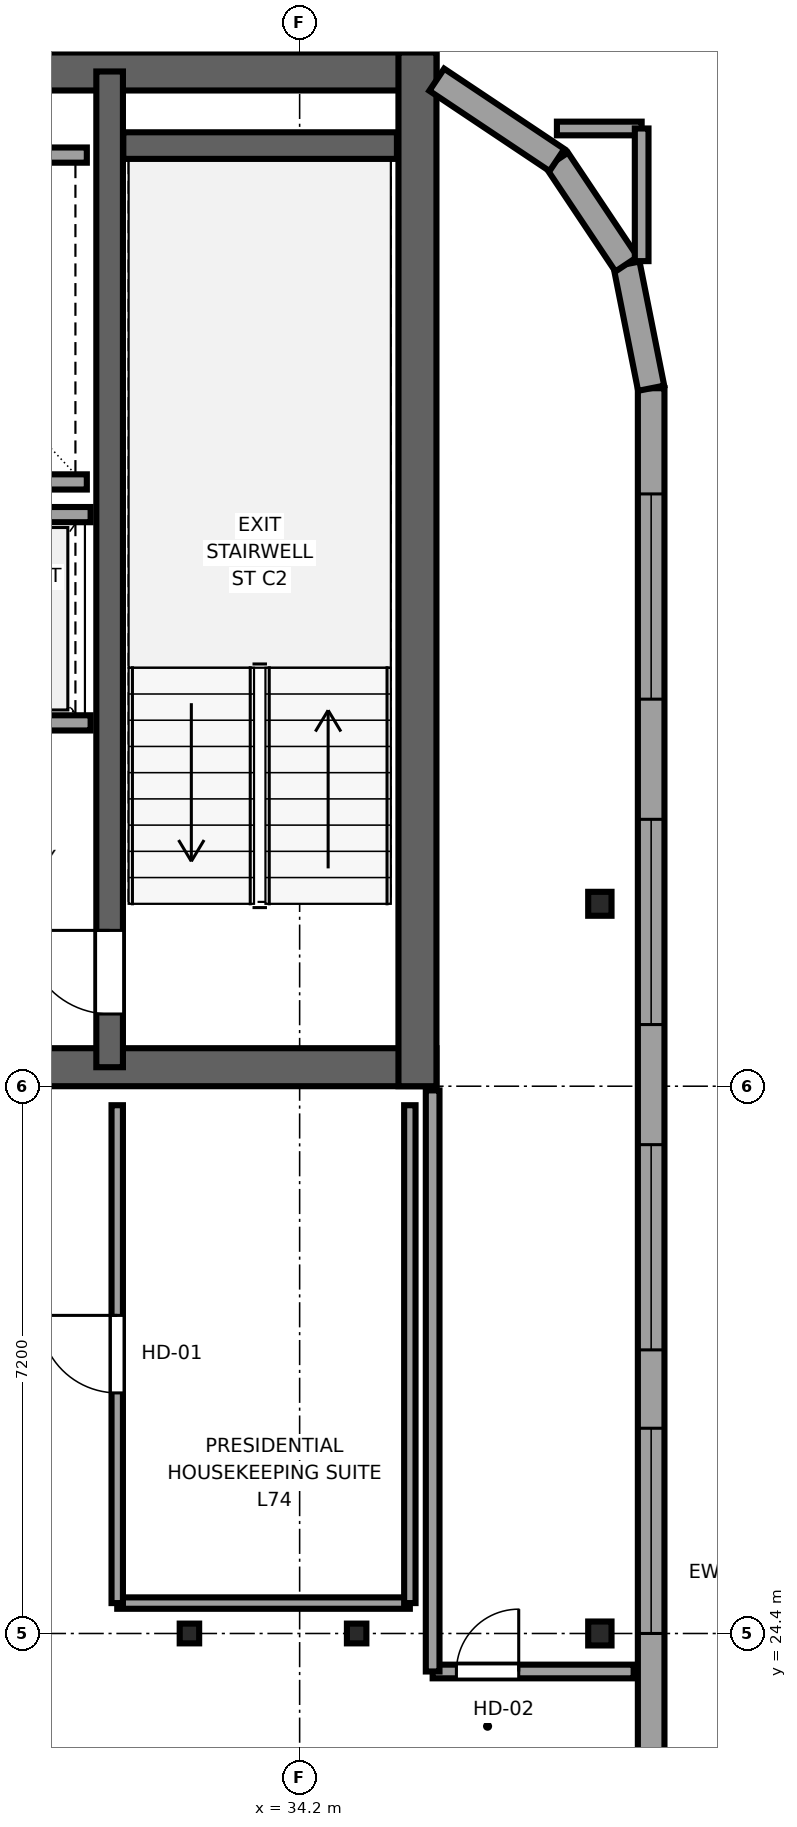
"""IFC4 building model, lengths in metres.
Left out: names, types, materials, properties, quantities, classifications, styles, units other than length and angle.
Written with IfcOpenShell. Run it as: python <this file> out.ifc"""

import sys

from ifc_helpers import new_model, si_unit, direction, frame, frame_2d, origin, origin_2d, place, context, subcontext, project, spatial, rectangle, i_section, extrude, source, transform, mapped, element, fill, save


model = new_model("IFC4")
c1 = context("Model", 3, precision=1e-05, world=origin(), true_north=direction((0.0, 1.0)))
c2 = subcontext(c1, "Body", "Model", "MODEL_VIEW")
j1 = project(units=[si_unit("LENGTHUNIT", "METRE"), si_unit("PLANEANGLEUNIT", "RADIAN")], contexts=[c1])
p1 = place(None, origin())
s1 = spatial("IfcSite", under=j1, at=p1, CompositionType="ELEMENT")
p2 = place(p1, origin())
s2 = spatial("IfcBuilding", under=s1, at=p2, CompositionType="ELEMENT")
p3 = place(p2, frame((0.0, 0.0, 278.6)))
s3 = spatial("IfcBuildingStorey", under=s2, at=p3, CompositionType="ELEMENT", Elevation=278.6)
p4 = place(p3, frame((10.0, 31.85, 0.0), z_axis=(0.0, 0.0, 1.0), x_axis=(1.0, 0.0, 0.0)))
e1 = element("IfcWall", 1, at=p4, inside=s3, PredefinedType="SHEAR", context=c2, shape_type="SweptSolid", body=[
    extrude(rectangle(XDim=26.0, YDim=0.5, at=frame_2d((13.0, 0.0))), origin(), (0.0, 0.0, 1.0), 3.55),
])
p5 = place(p4, frame((7.45, 0.0, 0.0), z_axis=(0.0, 0.0, 1.0), x_axis=(-1.0, 0.0, 0.0)))
e2 = element("IfcOpeningElement", 2, at=p5, cuts=e1, PredefinedType="OPENING", context=c2, shape_type="SweptSolid", body=[
    extrude(rectangle(XDim=1.5, YDim=2.04, at=frame_2d((0.75, 1.02))), frame((0.0, 0.26, 0.0), z_axis=(0.0, -1.0, 0.0), x_axis=(1.0, 0.0, 0.0)), (0.0, 0.0, 1.0), 0.52),
])
p6 = place(p4, frame((13.75, 0.0, 0.0), z_axis=(0.0, 0.0, 1.0), x_axis=(-1.0, 0.0, 0.0)))
e3 = element("IfcOpeningElement", 3, at=p6, cuts=e1, PredefinedType="OPENING", context=c2, shape_type="SweptSolid", body=[
    extrude(rectangle(XDim=1.5, YDim=2.04, at=frame_2d((0.75, 1.02))), frame((0.0, 0.26, 0.0), z_axis=(0.0, -1.0, 0.0), x_axis=(1.0, 0.0, 0.0)), (0.0, 0.0, 1.0), 0.52),
])
p7 = place(p4, frame((20.05, 0.0, 0.0), z_axis=(0.0, 0.0, 1.0), x_axis=(-1.0, 0.0, 0.0)))
e4 = element("IfcOpeningElement", 4, at=p7, cuts=e1, PredefinedType="OPENING", context=c2, shape_type="SweptSolid", body=[
    extrude(rectangle(XDim=1.5, YDim=2.04, at=frame_2d((0.75, 1.02))), frame((0.0, 0.26, 0.0), z_axis=(0.0, -1.0, 0.0), x_axis=(1.0, 0.0, 0.0)), (0.0, 0.0, 1.0), 0.52),
])
p8 = place(p3, frame((10.0, 44.95, 0.0), z_axis=(0.0, 0.0, 1.0), x_axis=(1.0, 0.0, 0.0)))
e5 = element("IfcWall", 5, at=p8, inside=s3, PredefinedType="SHEAR", context=c2, shape_type="SweptSolid", body=[
    extrude(rectangle(XDim=26.0, YDim=0.5, at=frame_2d((13.0, 0.0))), origin(), (0.0, 0.0, 1.0), 3.55),
])
p9 = place(p3, frame((35.75, 31.6, 0.0), z_axis=(0.0, 0.0, 1.0), x_axis=(0.0, 1.0, 0.0)))
e6 = element("IfcWall", 6, at=p9, inside=s3, PredefinedType="SHEAR", context=c2, shape_type="SweptSolid", body=[
    extrude(rectangle(XDim=13.6, YDim=0.5, at=frame_2d((6.8, 0.0))), origin(), (0.0, 0.0, 1.0), 3.55),
])
p10 = place(p3, frame((31.7, 31.85, 0.0), z_axis=(0.0, 0.0, 1.0), x_axis=(0.0, 1.0, 0.0)))
e7 = element("IfcWall", 7, at=p10, inside=s3, PredefinedType="SHEAR", context=c2, shape_type="SweptSolid", body=[
    extrude(rectangle(XDim=13.1, YDim=0.35, at=frame_2d((6.55, 0.0))), origin(), (0.0, 0.0, 1.0), 3.55),
])
p11 = place(p10, frame((1.8, 0.0, 0.0), z_axis=(0.0, 0.0, 1.0), x_axis=(-1.0, 0.0, 0.0)))
e8 = element("IfcOpeningElement", 8, at=p11, cuts=e7, PredefinedType="OPENING", context=c2, shape_type="SweptSolid", body=[
    extrude(rectangle(XDim=1.1, YDim=2.12, at=frame_2d((0.55, 1.06))), frame((0.0, 0.185, 0.0), z_axis=(0.0, -1.0, 0.0), x_axis=(1.0, 0.0, 0.0)), (0.0, 0.0, 1.0), 0.37),
])
p12 = place(p3, frame((31.88, 43.975, 0.0), z_axis=(0.0, 0.0, 1.0), x_axis=(1.0, 0.0, 0.0)))
e9 = element("IfcWall", 9, at=p12, inside=s3, PredefinedType="SHEAR", context=c2, shape_type="SweptSolid", body=[
    extrude(rectangle(XDim=3.6, YDim=0.35, at=frame_2d((1.8, 0.0))), origin(), (0.0, 0.0, 1.0), 3.55),
])
m1 = source(origin(), c2, "Body", "SweptSolid", [
    extrude(i_section(OverallWidth=0.256, OverallDepth=0.26, WebThickness=0.01, FlangeThickness=0.017, FilletRadius=0.014, at=origin_2d()), origin(), (0.0, 0.0, 1.0), 3.55),
])
for number, where, z_axis, x_axis in (
    (10, (32.75, 24.4, 0.0), (0.0, 0.0, 1.0), (1.0, 0.0, 0.0)),
    (11, (34.95, 24.4, 0.0), (0.0, 0.0, 1.0), (1.0, 0.0, 0.0)),
):
    element("IfcColumn", number, at=place(p3, frame(where, z_axis=z_axis, x_axis=x_axis)), inside=s3, PredefinedType="COLUMN", context=c2, shape_type="MappedRepresentation", body=[
        mapped(m1, transform((0.0, 0.0, 0.0), x_axis=(1.0, 0.0, 0.0), y_axis=(0.0, 1.0, 0.0), z_axis=(0.0, 0.0, 1.0), scale=1.0)),
    ])
m2 = source(origin(), c2, "Body", "SweptSolid", [
    extrude(i_section(OverallWidth=0.307, OverallDepth=0.315, WebThickness=0.012, FlangeThickness=0.019, FilletRadius=0.017, at=origin_2d()), origin(), (0.0, 0.0, 1.0), 3.55),
])
for number, where, z_axis, x_axis in (
    (12, (38.15, 24.4, 0.0), (0.0, 0.0, 1.0), (1.0, 0.0, 0.0)),
    (13, (38.15, 34.0, 0.0), (0.0, 0.0, 1.0), (1.0, 0.0, 0.0)),
):
    element("IfcColumn", number, at=place(p3, frame(where, z_axis=z_axis, x_axis=x_axis)), inside=s3, PredefinedType="COLUMN", context=c2, shape_type="MappedRepresentation", body=[
        mapped(m2, transform((0.0, 0.0, 0.0), x_axis=(1.0, 0.0, 0.0), y_axis=(0.0, 1.0, 0.0), z_axis=(0.0, 0.0, 1.0), scale=1.0)),
    ])
p13 = place(p3, frame((38.825, 9.617, 0.0), z_axis=(0.0, 0.0, 1.0), x_axis=(0.0, 1.0, 0.0)))
e14 = element("IfcWall", 14, at=p13, inside=s3, PredefinedType="SOLIDWALL", context=c2, shape_type="SweptSolid", body=[
    extrude(rectangle(XDim=31.166, YDim=0.35, at=frame_2d((15.583, 0.0))), origin(), (0.0, 0.0, 1.0), 3.33),
])
p14 = place(p13, frame((0.84, 0.0, 0.68)))
e15 = element("IfcOpeningElement", 15, at=p14, cuts=e14, PredefinedType="OPENING", context=c2, shape_type="SweptSolid", body=[
    extrude(rectangle(XDim=2.7, YDim=1.95, at=frame_2d((1.35, 0.975))), frame((0.0, 0.185, 0.0), z_axis=(0.0, -1.0, 0.0), x_axis=(1.0, 0.0, 0.0)), (0.0, 0.0, 1.0), 0.37),
])
p15 = place(p13, frame((5.671, 0.0, 0.68)))
e16 = element("IfcOpeningElement", 16, at=p15, cuts=e14, PredefinedType="OPENING", context=c2, shape_type="SweptSolid", body=[
    extrude(rectangle(XDim=2.7, YDim=1.95, at=frame_2d((1.35, 0.975))), frame((0.0, 0.185, 0.0), z_axis=(0.0, -1.0, 0.0), x_axis=(1.0, 0.0, 0.0)), (0.0, 0.0, 1.0), 0.37),
])
p16 = place(p13, frame((8.902, 0.0, 0.68)))
e17 = element("IfcOpeningElement", 17, at=p16, cuts=e14, PredefinedType="OPENING", context=c2, shape_type="SweptSolid", body=[
    extrude(rectangle(XDim=2.7, YDim=1.95, at=frame_2d((1.35, 0.975))), frame((0.0, 0.185, 0.0), z_axis=(0.0, -1.0, 0.0), x_axis=(1.0, 0.0, 0.0)), (0.0, 0.0, 1.0), 0.37),
])
p17 = place(p13, frame((14.783, 0.0, 0.68)))
e18 = element("IfcOpeningElement", 18, at=p17, cuts=e14, PredefinedType="OPENING", context=c2, shape_type="SweptSolid", body=[
    extrude(rectangle(XDim=2.7, YDim=1.95, at=frame_2d((1.35, 0.975))), frame((0.0, 0.185, 0.0), z_axis=(0.0, -1.0, 0.0), x_axis=(1.0, 0.0, 0.0)), (0.0, 0.0, 1.0), 0.37),
])
p18 = place(p13, frame((18.514, 0.0, 0.68)))
e19 = element("IfcOpeningElement", 19, at=p18, cuts=e14, PredefinedType="OPENING", context=c2, shape_type="SweptSolid", body=[
    extrude(rectangle(XDim=2.7, YDim=1.95, at=frame_2d((1.35, 0.975))), frame((0.0, 0.185, 0.0), z_axis=(0.0, -1.0, 0.0), x_axis=(1.0, 0.0, 0.0)), (0.0, 0.0, 1.0), 0.37),
])
p19 = place(p13, frame((22.794, 0.0, 0.68)))
e20 = element("IfcOpeningElement", 20, at=p19, cuts=e14, PredefinedType="OPENING", context=c2, shape_type="SweptSolid", body=[
    extrude(rectangle(XDim=2.7, YDim=1.95, at=frame_2d((1.35, 0.975))), frame((0.0, 0.185, 0.0), z_axis=(0.0, -1.0, 0.0), x_axis=(1.0, 0.0, 0.0)), (0.0, 0.0, 1.0), 0.37),
])
p20 = place(p13, frame((27.075, 0.0, 0.68)))
e21 = element("IfcOpeningElement", 21, at=p20, cuts=e14, PredefinedType="OPENING", context=c2, shape_type="SweptSolid", body=[
    extrude(rectangle(XDim=2.7, YDim=1.95, at=frame_2d((1.35, 0.975))), frame((0.0, 0.185, 0.0), z_axis=(0.0, -1.0, 0.0), x_axis=(1.0, 0.0, 0.0)), (0.0, 0.0, 1.0), 0.37),
])
p21 = place(p3, frame((38.825, 40.783, 0.0), z_axis=(0.0, 0.0, 1.0), x_axis=(-0.195044345786, 0.980794424524, 0.0)))
e22 = element("IfcWall", 22, at=p21, inside=s3, PredefinedType="SOLIDWALL", context=c2, shape_type="SweptSolid", body=[
    extrude(rectangle(XDim=1.665, YDim=0.35, at=frame_2d((0.833, 0.0))), origin(), (0.0, 0.0, 1.0), 3.33),
])
p22 = place(p3, frame((38.5, 42.416, 0.0), z_axis=(0.0, 0.0, 1.0), x_axis=(-0.555520825599, 0.831502623162, 0.0)))
e23 = element("IfcWall", 23, at=p22, inside=s3, PredefinedType="SOLIDWALL", context=c2, shape_type="SweptSolid", body=[
    extrude(rectangle(XDim=1.647, YDim=0.35, at=frame_2d((0.824, 0.0))), origin(), (0.0, 0.0, 1.0), 3.33),
])
p23 = place(p3, frame((37.585, 43.785, 0.0), z_axis=(0.0, 0.0, 1.0), x_axis=(-0.831516639465, 0.555499845448, 0.0)))
e24 = element("IfcWall", 24, at=p23, inside=s3, PredefinedType="SOLIDWALL", context=c2, shape_type="SweptSolid", body=[
    extrude(rectangle(XDim=1.902, YDim=0.35, at=frame_2d((0.951, 0.0))), origin(), (0.0, 0.0, 1.0), 3.33),
])
for number, where, z_axis, x_axis in (
    (25, (27.3, 39.55, 0.0), (0.0, 0.0, 1.0), (1.0, 0.0, 0.0)),
    (26, (27.3, 43.85, 0.0), (0.0, 0.0, 1.0), (1.0, 0.0, 0.0)),
):
    element("IfcWall", number, at=place(p3, frame(where, z_axis=z_axis, x_axis=x_axis)), inside=s3, PredefinedType="SOLIDWALL", context=c2, shape_type="SweptSolid", body=[
        extrude(rectangle(XDim=4.1, YDim=0.2, at=frame_2d((2.05, 0.0))), origin(), (0.0, 0.0, 1.0), 3.33),
    ])
p24 = place(p3, frame((27.375, 36.38, 0.0), z_axis=(0.0, 0.0, 1.0), x_axis=(1.0, 0.0, 0.0)))
e27 = element("IfcWall", 27, at=p24, inside=s3, PredefinedType="SOLIDWALL", context=c2, shape_type="SweptSolid", body=[
    extrude(rectangle(XDim=4.075, YDim=0.2, at=frame_2d((2.038, 0.0))), origin(), (0.0, 0.0, 1.0), 3.33),
])
p25 = place(p24, frame((0.525, 0.0, 0.0)))
e28 = element("IfcOpeningElement", 28, at=p25, cuts=e27, PredefinedType="OPENING", context=c2, shape_type="SweptSolid", body=[
    extrude(rectangle(XDim=1.1, YDim=2.12, at=frame_2d((0.55, 1.06))), frame((0.0, 0.11, 0.0), z_axis=(0.0, -1.0, 0.0), x_axis=(1.0, 0.0, 0.0)), (0.0, 0.0, 1.0), 0.22),
])
p26 = place(p24, frame((2.425, 0.0, 0.0)))
e29 = element("IfcOpeningElement", 29, at=p26, cuts=e27, PredefinedType="OPENING", context=c2, shape_type="SweptSolid", body=[
    extrude(rectangle(XDim=1.1, YDim=2.12, at=frame_2d((0.55, 1.06))), frame((0.0, 0.11, 0.0), z_axis=(0.0, -1.0, 0.0), x_axis=(1.0, 0.0, 0.0)), (0.0, 0.0, 1.0), 0.22),
])
p27 = place(p3, frame((27.375, 39.12, 0.0), z_axis=(0.0, 0.0, 1.0), x_axis=(1.0, 0.0, 0.0)))
e30 = element("IfcWall", 30, at=p27, inside=s3, PredefinedType="SOLIDWALL", context=c2, shape_type="SweptSolid", body=[
    extrude(rectangle(XDim=4.075, YDim=0.2, at=frame_2d((2.038, 0.0))), origin(), (0.0, 0.0, 1.0), 3.33),
])
p28 = place(p3, frame((31.8, 24.8, 0.0), z_axis=(0.0, 0.0, 1.0), x_axis=(1.0, 0.0, 0.0)))
e31 = element("IfcWall", 31, at=p28, inside=s3, PredefinedType="PARTITIONING", context=c2, shape_type="SweptSolid", body=[
    extrude(rectangle(XDim=3.85, YDim=0.15, at=frame_2d((1.925, 0.0))), origin(), (0.0, 0.0, 1.0), 3.33),
])
p29 = place(p3, frame((31.8, 24.8, 0.0), z_axis=(0.0, 0.0, 1.0), x_axis=(0.0, 1.0, 0.0)))
e32 = element("IfcWall", 32, at=p29, inside=s3, PredefinedType="PARTITIONING", context=c2, shape_type="SweptSolid", body=[
    extrude(rectangle(XDim=6.55, YDim=0.15, at=frame_2d((3.275, 0.0))), origin(), (0.0, 0.0, 1.0), 3.33),
])
p30 = place(p29, frame((2.765, 0.0, 0.0)))
e33 = element("IfcOpeningElement", 33, at=p30, cuts=e32, PredefinedType="OPENING", context=c2, shape_type="SweptSolid", body=[
    extrude(rectangle(XDim=1.02, YDim=2.03, at=frame_2d((0.51, 1.015))), frame((0.0, 0.085, 0.0), z_axis=(0.0, -1.0, 0.0), x_axis=(1.0, 0.0, 0.0)), (0.0, 0.0, 1.0), 0.17),
])
p31 = place(p3, frame((35.65, 24.8, 0.0), z_axis=(0.0, 0.0, 1.0), x_axis=(0.0, 1.0, 0.0)))
e34 = element("IfcWall", 34, at=p31, inside=s3, PredefinedType="PARTITIONING", context=c2, shape_type="SweptSolid", body=[
    extrude(rectangle(XDim=6.55, YDim=0.15, at=frame_2d((3.275, 0.0))), origin(), (0.0, 0.0, 1.0), 3.33),
])
p32 = place(p3, frame((35.95, 23.9, 0.0), z_axis=(0.0, 0.0, 1.0), x_axis=(1.0, 0.0, 0.0)))
e35 = element("IfcWall", 35, at=p32, inside=s3, PredefinedType="PARTITIONING", context=c2, shape_type="SweptSolid", body=[
    extrude(rectangle(XDim=2.645, YDim=0.18, at=frame_2d((1.323, 0.0))), origin(), (0.0, 0.0, 1.0), 3.33),
])
p33 = place(p32, frame((0.312, 0.0, 0.0)))
e36 = element("IfcOpeningElement", 36, at=p33, cuts=e35, PredefinedType="OPENING", context=c2, shape_type="SweptSolid", body=[
    extrude(rectangle(XDim=0.82, YDim=2.01, at=frame_2d((0.41, 1.005))), frame((0.0, 0.1, 0.0), z_axis=(0.0, -1.0, 0.0), x_axis=(1.0, 0.0, 0.0)), (0.0, 0.0, 1.0), 0.2),
])
p34 = place(p3, frame((37.585, 44.2, 0.0), z_axis=(0.0, 0.0, 1.0), x_axis=(1.0, 0.0, 0.0)))
e37 = element("IfcWall", 37, at=p34, inside=s3, PredefinedType="PARTITIONING", context=c2, shape_type="SweptSolid", body=[
    extrude(rectangle(XDim=1.115, YDim=0.18, at=frame_2d((0.558, 0.0))), origin(), (0.0, 0.0, 1.0), 3.33),
])
p35 = place(p3, frame((35.95, 23.9, 0.0), z_axis=(0.0, 0.0, 1.0), x_axis=(0.0, 1.0, 0.0)))
e38 = element("IfcWall", 38, at=p35, inside=s3, PredefinedType="PARTITIONING", context=c2, shape_type="SweptSolid", body=[
    extrude(rectangle(XDim=7.645, YDim=0.18, at=frame_2d((3.823, 0.0))), origin(), (0.0, 0.0, 1.0), 3.33),
])
p36 = place(p3, frame((38.7, 42.455, 0.0), z_axis=(0.0, 0.0, 1.0), x_axis=(0.0, 1.0, 0.0)))
e39 = element("IfcWall", 39, at=p36, inside=s3, PredefinedType="PARTITIONING", context=c2, shape_type="SweptSolid", body=[
    extrude(rectangle(XDim=1.745, YDim=0.18, at=frame_2d((0.873, 0.0))), origin(), (0.0, 0.0, 1.0), 3.33),
])
m3 = source(origin(), c2, "Body", "SweptSolid", [
    extrude(rectangle(XDim=2.7, YDim=1.95, at=frame_2d((1.35, 0.975))), frame((0.0, 0.09, 0.0), z_axis=(0.0, -1.0, 0.0), x_axis=(1.0, 0.0, 0.0)), (0.0, 0.0, 1.0), 0.06),
])
p37 = place(p17, origin())
e40 = element("IfcWindow", 40, at=p37, inside=s3, PartitioningType="TRIPLE_PANEL_HORIZONTAL", PredefinedType="WINDOW", context=c2, shape_type="MappedRepresentation", body=[
    mapped(m3, transform((0.0, 0.0, 0.0), x_axis=(1.0, 0.0, 0.0), y_axis=(0.0, 1.0, 0.0), z_axis=(0.0, 0.0, 1.0), scale=1.0)),
])
fill(e18, e40)
p38 = place(p18, origin())
e41 = element("IfcWindow", 41, at=p38, inside=s3, PartitioningType="TRIPLE_PANEL_HORIZONTAL", PredefinedType="WINDOW", context=c2, shape_type="MappedRepresentation", body=[
    mapped(m3, transform((0.0, 0.0, 0.0), x_axis=(1.0, 0.0, 0.0), y_axis=(0.0, 1.0, 0.0), z_axis=(0.0, 0.0, 1.0), scale=1.0)),
])
fill(e19, e41)
p39 = place(p19, origin())
e42 = element("IfcWindow", 42, at=p39, inside=s3, PartitioningType="TRIPLE_PANEL_HORIZONTAL", PredefinedType="WINDOW", context=c2, shape_type="MappedRepresentation", body=[
    mapped(m3, transform((0.0, 0.0, 0.0), x_axis=(1.0, 0.0, 0.0), y_axis=(0.0, 1.0, 0.0), z_axis=(0.0, 0.0, 1.0), scale=1.0)),
])
fill(e20, e42)
p40 = place(p20, origin())
e43 = element("IfcWindow", 43, at=p40, inside=s3, PartitioningType="TRIPLE_PANEL_HORIZONTAL", PredefinedType="WINDOW", context=c2, shape_type="MappedRepresentation", body=[
    mapped(m3, transform((0.0, 0.0, 0.0), x_axis=(1.0, 0.0, 0.0), y_axis=(0.0, 1.0, 0.0), z_axis=(0.0, 0.0, 1.0), scale=1.0)),
])
fill(e21, e43)
m4 = source(origin(), c2, "Body", "SweptSolid", [
    extrude(rectangle(XDim=1.1, YDim=2.12, at=frame_2d((0.55, 1.06))), frame((0.0, 0.025, 0.0), z_axis=(0.0, -1.0, 0.0), x_axis=(1.0, 0.0, 0.0)), (0.0, 0.0, 1.0), 0.05),
])
p41 = place(p11, origin())
e44 = element("IfcDoor", 44, at=p41, inside=s3, OperationType="SINGLE_SWING_RIGHT", PredefinedType="DOOR", context=c2, shape_type="MappedRepresentation", body=[
    mapped(m4, transform((0.0, 0.0, 0.0), x_axis=(1.0, 0.0, 0.0), y_axis=(0.0, 1.0, 0.0), z_axis=(0.0, 0.0, 1.0), scale=1.0)),
])
fill(e8, e44)
m5 = source(origin(), c2, "Body", "SweptSolid", [
    extrude(rectangle(XDim=1.02, YDim=2.03, at=frame_2d((0.51, 1.015))), frame((0.0, 0.025, 0.0), z_axis=(0.0, -1.0, 0.0), x_axis=(1.0, 0.0, 0.0)), (0.0, 0.0, 1.0), 0.05),
])
p42 = place(p30, origin())
e45 = element("IfcDoor", 45, at=p42, inside=s3, OperationType="SINGLE_SWING_RIGHT", PredefinedType="DOOR", context=c2, shape_type="MappedRepresentation", body=[
    mapped(m5, transform((0.0, 0.0, 0.0), x_axis=(1.0, 0.0, 0.0), y_axis=(0.0, 1.0, 0.0), z_axis=(0.0, 0.0, 1.0), scale=1.0)),
])
fill(e33, e45)
m6 = source(origin(), c2, "Body", "SweptSolid", [
    extrude(rectangle(XDim=0.82, YDim=2.01, at=frame_2d((0.41, 1.005))), frame((0.0, 0.025, 0.0), z_axis=(0.0, -1.0, 0.0), x_axis=(1.0, 0.0, 0.0)), (0.0, 0.0, 1.0), 0.05),
])
p43 = place(p33, origin())
e46 = element("IfcDoor", 46, at=p43, inside=s3, OperationType="SINGLE_SWING_RIGHT", PredefinedType="DOOR", context=c2, shape_type="MappedRepresentation", body=[
    mapped(m6, transform((0.0, 0.0, 0.0), x_axis=(1.0, 0.0, 0.0), y_axis=(0.0, 1.0, 0.0), z_axis=(0.0, 0.0, 1.0), scale=1.0)),
])
fill(e36, e46)
save(model, sys.argv[1])
